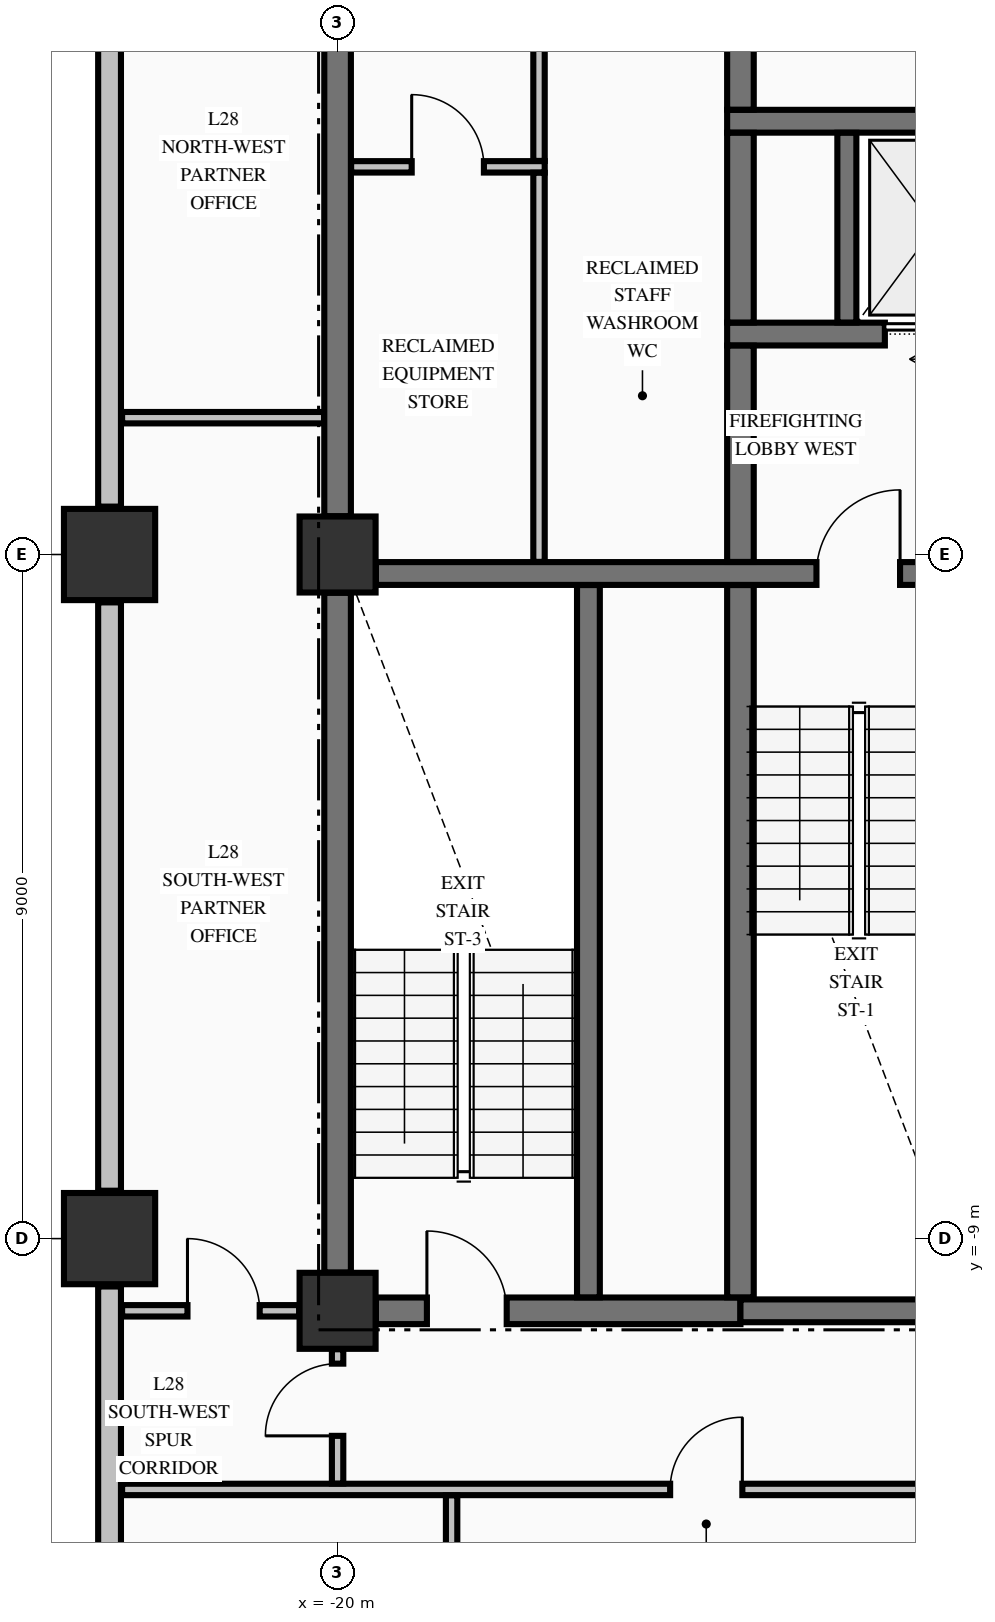
"""IFC4 building model, lengths in metres.
Left out: names, types, materials, properties, quantities, classifications, styles, units other than length and angle.
Written with IfcOpenShell. Run it as: python <this file> out.ifc"""

import sys

from ifc_helpers import new_model, si_unit, direction, frame, frame_2d, origin, origin_2d, place, context, subcontext, project, spatial, rectangle, extrude, element, fill, save


model = new_model("IFC4")
c1 = context("Model", 3, precision=1e-05, world=origin(), true_north=direction((0.0, 1.0)))
c2 = subcontext(c1, "Body", "Model", "MODEL_VIEW")
j1 = project(units=[si_unit("LENGTHUNIT", "METRE"), si_unit("PLANEANGLEUNIT", "RADIAN")], contexts=[c1])
p1 = place(None, origin())
s1 = spatial("IfcSite", under=j1, at=p1, CompositionType="ELEMENT")
p2 = place(p1, origin())
s2 = spatial("IfcBuilding", under=s1, at=p2, CompositionType="ELEMENT")
p3 = place(p2, frame((0.0, 0.0, 112.78)))
s3 = spatial("IfcBuildingStorey", under=s2, at=p3, CompositionType="ELEMENT", Elevation=112.78)
for number, where, z_axis, x_axis in (
    (1, (-23.0, -9.0, -0.25), (0.0, 0.0, 1.0), (1.0, 0.0, 0.0)),
    (2, (-23.0, 0.0, -0.25), (0.0, 0.0, 1.0), (1.0, 0.0, 0.0)),
):
    element("IfcColumn", number, at=place(p3, frame(where, z_axis=z_axis, x_axis=x_axis)), inside=s3, PredefinedType="COLUMN", context=c2, shape_type="SweptSolid", body=[
        extrude(rectangle(XDim=1.2, YDim=1.2, at=origin_2d()), origin(), (0.0, 0.0, 1.0), 3.395),
    ])
for number, where, z_axis, x_axis in (
    (3, (-20.0, -9.95, -0.25), (0.0, 0.0, 1.0), (1.0, 0.0, 0.0)),
    (4, (-20.0, 0.0, -0.25), (0.0, 0.0, 1.0), (1.0, 0.0, 0.0)),
):
    element("IfcColumn", number, at=place(p3, frame(where, z_axis=z_axis, x_axis=x_axis)), inside=s3, PredefinedType="COLUMN", context=c2, shape_type="SweptSolid", body=[
        extrude(rectangle(XDim=1.0, YDim=1.0, at=origin_2d()), origin(), (0.0, 0.0, 1.0), 3.395),
    ])
p4 = place(p3, frame((-23.0, -9.63, 0.0), z_axis=(0.0, 0.0, 1.0), x_axis=(0.0, -1.0, 0.0)))
e5 = element("IfcWall", 5, at=p4, inside=s3, PredefinedType="STANDARD", context=c2, shape_type="SweptSolid", body=[
    extrude(rectangle(XDim=10.74, YDim=0.3, at=frame_2d((5.37, 0.0))), origin(), (0.0, 0.0, 1.0), 2.537),
])
for number, where, z_axis, x_axis in (
    (6, (-23.0, -0.63, 0.0), (0.0, 0.0, 1.0), (0.0, -1.0, 0.0)),
    (7, (-23.0, 8.37, 0.0), (0.0, 0.0, 1.0), (0.0, -1.0, 0.0)),
):
    element("IfcWall", number, at=place(p3, frame(where, z_axis=z_axis, x_axis=x_axis)), inside=s3, PredefinedType="STANDARD", context=c2, shape_type="SweptSolid", body=[
        extrude(rectangle(XDim=7.74, YDim=0.3, at=frame_2d((3.87, 0.0))), origin(), (0.0, 0.0, 1.0), 2.537),
    ])
p5 = place(p3, frame((-19.496, -9.95, 0.0), z_axis=(0.0, 0.0, 1.0), x_axis=(1.0, 0.0, 0.0)))
e8 = element("IfcWall", 8, at=p5, inside=s3, PredefinedType="SHEAR", context=c2, shape_type="SweptSolid", body=[
    extrude(rectangle(XDim=4.796, YDim=0.35, at=frame_2d((2.398, 0.0))), origin(), (0.0, 0.0, 1.0), 3.145),
])
p6 = place(p5, frame((0.671, 0.0, 0.0)))
e9 = element("IfcOpeningElement", 9, at=p6, cuts=e8, PredefinedType="OPENING", context=c2, shape_type="SweptSolid", body=[
    extrude(rectangle(XDim=1.05, YDim=2.15, at=frame_2d((0.525, 1.075))), frame((0.0, 0.185, 0.0), z_axis=(0.0, -1.0, 0.0), x_axis=(1.0, 0.0, 0.0)), (0.0, 0.0, 1.0), 0.37),
])
p7 = place(p3, frame((-14.7, -9.95, 0.0), z_axis=(0.0, 0.0, 1.0), x_axis=(1.0, 0.0, 0.0)))
e10 = element("IfcWall", 10, at=p7, inside=s3, PredefinedType="SHEAR", context=c2, shape_type="SweptSolid", body=[
    extrude(rectangle(XDim=3.196, YDim=0.3, at=frame_2d((1.598, 0.0))), origin(), (0.0, 0.0, 1.0), 3.145),
])
p8 = place(p3, frame((-19.496, -0.25, 0.0), z_axis=(0.0, 0.0, 1.0), x_axis=(1.0, 0.0, 0.0)))
e11 = element("IfcWall", 11, at=p8, inside=s3, PredefinedType="SHEAR", context=c2, shape_type="SweptSolid", body=[
    extrude(rectangle(XDim=7.992, YDim=0.3, at=frame_2d((3.996, 0.0))), origin(), (0.0, 0.0, 1.0), 3.145),
])
p9 = place(p8, frame((5.796, 0.0, 0.0)))
e12 = element("IfcOpeningElement", 12, at=p9, cuts=e11, PredefinedType="OPENING", context=c2, shape_type="SweptSolid", body=[
    extrude(rectangle(XDim=1.1, YDim=2.15, at=frame_2d((0.55, 1.075))), frame((0.0, 0.16, 0.0), z_axis=(0.0, -1.0, 0.0), x_axis=(1.0, 0.0, 0.0)), (0.0, 0.0, 1.0), 0.32),
])
p10 = place(p3, frame((-14.875, 2.9, 0.0), z_axis=(0.0, 0.0, 1.0), x_axis=(1.0, 0.0, 0.0)))
e13 = element("IfcWall", 13, at=p10, inside=s3, PredefinedType="SHEAR", context=c2, shape_type="SweptSolid", body=[
    extrude(rectangle(XDim=4.025, YDim=0.3, at=frame_2d((2.012, 0.0))), origin(), (0.0, 0.0, 1.0), 3.145),
])
p11 = place(p10, frame((2.075, 0.0, 0.0)))
e14 = element("IfcOpeningElement", 14, at=p11, cuts=e13, PredefinedType="OPENING", context=c2, shape_type="SweptSolid", body=[
    extrude(rectangle(XDim=1.1, YDim=2.2, at=frame_2d((0.55, 1.1))), frame((0.0, 0.16, 0.0), z_axis=(0.0, -1.0, 0.0), x_axis=(1.0, 0.0, 0.0)), (0.0, 0.0, 1.0), 0.32),
])
p12 = place(p3, frame((-14.875, 5.7, 0.0), z_axis=(0.0, 0.0, 1.0), x_axis=(1.0, 0.0, 0.0)))
e15 = element("IfcWall", 15, at=p12, inside=s3, PredefinedType="SHEAR", context=c2, shape_type="SweptSolid", body=[
    extrude(rectangle(XDim=4.025, YDim=0.3, at=frame_2d((2.012, 0.0))), origin(), (0.0, 0.0, 1.0), 3.145),
])
p13 = place(p3, frame((-22.835, -12.3, 0.0), z_axis=(0.0, 0.0, 1.0), x_axis=(1.0, 0.0, 0.0)))
e16 = element("IfcWall", 16, at=p13, inside=s3, PredefinedType="PARTITIONING", context=c2, shape_type="SweptSolid", body=[
    extrude(rectangle(XDim=50.67, YDim=0.15, at=frame_2d((25.335, 0.0))), origin(), (0.0, 0.0, 1.0), 3.145),
])
p14 = place(p13, frame((7.21, 0.0, 0.0)))
e17 = element("IfcOpeningElement", 17, at=p14, cuts=e16, PredefinedType="OPENING", context=c2, shape_type="SweptSolid", body=[
    extrude(rectangle(XDim=0.95, YDim=2.15, at=frame_2d((0.475, 1.075))), frame((0.0, 0.085, 0.0), z_axis=(0.0, -1.0, 0.0), x_axis=(1.0, 0.0, 0.0)), (0.0, 0.0, 1.0), 0.17),
])
p15 = place(p13, frame((16.81, 0.0, 0.0)))
e18 = element("IfcOpeningElement", 18, at=p15, cuts=e16, PredefinedType="OPENING", context=c2, shape_type="SweptSolid", body=[
    extrude(rectangle(XDim=1.05, YDim=2.15, at=frame_2d((0.525, 1.075))), frame((0.0, 0.085, 0.0), z_axis=(0.0, -1.0, 0.0), x_axis=(1.0, 0.0, 0.0)), (0.0, 0.0, 1.0), 0.17),
])
p16 = place(p13, frame((28.41, 0.0, 0.0)))
e19 = element("IfcOpeningElement", 19, at=p16, cuts=e16, PredefinedType="OPENING", context=c2, shape_type="SweptSolid", body=[
    extrude(rectangle(XDim=1.05, YDim=2.15, at=frame_2d((0.525, 1.075))), frame((0.0, 0.085, 0.0), z_axis=(0.0, -1.0, 0.0), x_axis=(1.0, 0.0, 0.0)), (0.0, 0.0, 1.0), 0.17),
])
p17 = place(p13, frame((37.91, 0.0, 0.0)))
e20 = element("IfcOpeningElement", 20, at=p17, cuts=e16, PredefinedType="OPENING", context=c2, shape_type="SweptSolid", body=[
    extrude(rectangle(XDim=1.05, YDim=2.15, at=frame_2d((0.525, 1.075))), frame((0.0, 0.085, 0.0), z_axis=(0.0, -1.0, 0.0), x_axis=(1.0, 0.0, 0.0)), (0.0, 0.0, 1.0), 0.17),
])
p18 = place(p3, frame((-22.835, -9.95, 0.0), z_axis=(0.0, 0.0, 1.0), x_axis=(1.0, 0.0, 0.0)))
e21 = element("IfcWall", 21, at=p18, inside=s3, PredefinedType="PARTITIONING", context=c2, shape_type="SweptSolid", body=[
    extrude(rectangle(XDim=2.329, YDim=0.15, at=frame_2d((1.165, 0.0))), origin(), (0.0, 0.0, 1.0), 3.145),
])
p19 = place(p18, frame((0.86, 0.0, 0.0)))
e22 = element("IfcOpeningElement", 22, at=p19, cuts=e21, PredefinedType="OPENING", context=c2, shape_type="SweptSolid", body=[
    extrude(rectangle(XDim=0.95, YDim=2.15, at=frame_2d((0.475, 1.075))), frame((0.0, 0.085, 0.0), z_axis=(0.0, -1.0, 0.0), x_axis=(1.0, 0.0, 0.0)), (0.0, 0.0, 1.0), 0.17),
])
p20 = place(p3, frame((-22.835, 1.8, 0.0), z_axis=(0.0, 0.0, 1.0), x_axis=(1.0, 0.0, 0.0)))
e23 = element("IfcWall", 23, at=p20, inside=s3, PredefinedType="PARTITIONING", context=c2, shape_type="SweptSolid", body=[
    extrude(rectangle(XDim=2.657, YDim=0.15, at=frame_2d((1.329, 0.0))), origin(), (0.0, 0.0, 1.0), 3.145),
])
p21 = place(p3, frame((-19.822, 5.1, 0.0), z_axis=(0.0, 0.0, 1.0), x_axis=(1.0, 0.0, 0.0)))
e24 = element("IfcWall", 24, at=p21, inside=s3, PredefinedType="PARTITIONING", context=c2, shape_type="SweptSolid", body=[
    extrude(rectangle(XDim=2.547, YDim=0.15, at=frame_2d((1.273, 0.0))), origin(), (0.0, 0.0, 1.0), 3.145),
])
p22 = place(p21, frame((0.797, 0.0, 0.0)))
e25 = element("IfcOpeningElement", 25, at=p22, cuts=e24, PredefinedType="OPENING", context=c2, shape_type="SweptSolid", body=[
    extrude(rectangle(XDim=0.95, YDim=2.15, at=frame_2d((0.475, 1.075))), frame((0.0, 0.085, 0.0), z_axis=(0.0, -1.0, 0.0), x_axis=(1.0, 0.0, 0.0)), (0.0, 0.0, 1.0), 0.17),
])
p23 = place(p3, frame((-20.0, -9.446, 0.0), z_axis=(0.0, 0.0, 1.0), x_axis=(0.0, 1.0, 0.0)))
e26 = element("IfcWall", 26, at=p23, inside=s3, PredefinedType="SHEAR", context=c2, shape_type="SweptSolid", body=[
    extrude(rectangle(XDim=8.942, YDim=0.35, at=frame_2d((4.471, 0.0))), origin(), (0.0, 0.0, 1.0), 3.145),
])
p24 = place(p3, frame((-20.0, 0.504, 0.0), z_axis=(0.0, 0.0, 1.0), x_axis=(0.0, 1.0, 0.0)))
e27 = element("IfcWall", 27, at=p24, inside=s3, PredefinedType="SHEAR", context=c2, shape_type="SweptSolid", body=[
    extrude(rectangle(XDim=9.492, YDim=0.35, at=frame_2d((4.746, 0.0))), origin(), (0.0, 0.0, 1.0), 3.145),
])
p25 = place(p3, frame((-16.7, -9.773, 0.0), z_axis=(0.0, 0.0, 1.0), x_axis=(0.0, 1.0, 0.0)))
e28 = element("IfcWall", 28, at=p25, inside=s3, PredefinedType="SHEAR", context=c2, shape_type="SweptSolid", body=[
    extrude(rectangle(XDim=9.371, YDim=0.3, at=frame_2d((4.686, 0.0))), origin(), (0.0, 0.0, 1.0), 3.145),
])
p26 = place(p3, frame((-14.7, -9.773, 0.0), z_axis=(0.0, 0.0, 1.0), x_axis=(0.0, 1.0, 0.0)))
e29 = element("IfcWall", 29, at=p26, inside=s3, PredefinedType="SHEAR", context=c2, shape_type="SweptSolid", body=[
    extrude(rectangle(XDim=9.371, YDim=0.35, at=frame_2d((4.686, 0.0))), origin(), (0.0, 0.0, 1.0), 3.145),
])
p27 = place(p3, frame((-14.7, -0.098, 0.0), z_axis=(0.0, 0.0, 1.0), x_axis=(0.0, 1.0, 0.0)))
e30 = element("IfcWall", 30, at=p27, inside=s3, PredefinedType="SHEAR", context=c2, shape_type="SweptSolid", body=[
    extrude(rectangle(XDim=2.846, YDim=0.35, at=frame_2d((1.423, 0.0))), origin(), (0.0, 0.0, 1.0), 3.145),
])
p28 = place(p3, frame((-14.7, 3.052, 0.0), z_axis=(0.0, 0.0, 1.0), x_axis=(0.0, 1.0, 0.0)))
e31 = element("IfcWall", 31, at=p28, inside=s3, PredefinedType="SHEAR", context=c2, shape_type="SweptSolid", body=[
    extrude(rectangle(XDim=2.496, YDim=0.35, at=frame_2d((1.248, 0.0))), origin(), (0.0, 0.0, 1.0), 3.145),
])
p29 = place(p3, frame((-14.7, 5.852, 0.0), z_axis=(0.0, 0.0, 1.0), x_axis=(0.0, 1.0, 0.0)))
e32 = element("IfcWall", 32, at=p29, inside=s3, PredefinedType="SHEAR", context=c2, shape_type="SweptSolid", body=[
    extrude(rectangle(XDim=4.471, YDim=0.35, at=frame_2d((2.235, 0.0))), origin(), (0.0, 0.0, 1.0), 3.145),
])
p30 = place(p3, frame((-13.3, 3.052, 0.0), z_axis=(0.0, 0.0, 1.0), x_axis=(0.0, 1.0, 0.0)))
e33 = element("IfcWall", 33, at=p30, inside=s3, PredefinedType="SOLIDWALL", context=c2, shape_type="SweptSolid", body=[
    extrude(rectangle(XDim=2.496, YDim=0.25, at=frame_2d((1.248, 0.0))), origin(), (0.0, 0.0, 1.0), 3.145),
])
p31 = place(p3, frame((-20.0, -12.222, 0.0), z_axis=(0.0, 0.0, 1.0), x_axis=(0.0, 1.0, 0.0)))
e34 = element("IfcWall", 34, at=p31, inside=s3, PredefinedType="PARTITIONING", context=c2, shape_type="SweptSolid", body=[
    extrude(rectangle(XDim=1.766, YDim=0.15, at=frame_2d((0.883, 0.0))), origin(), (0.0, 0.0, 1.0), 2.635),
])
p32 = place(p31, frame((0.627, 0.0, 0.0)))
e35 = element("IfcOpeningElement", 35, at=p32, cuts=e34, PredefinedType="OPENING", context=c2, shape_type="SweptSolid", body=[
    extrude(rectangle(XDim=0.95, YDim=2.15, at=frame_2d((0.475, 1.075))), frame((0.0, 0.085, 0.0), z_axis=(0.0, -1.0, 0.0), x_axis=(1.0, 0.0, 0.0)), (0.0, 0.0, 1.0), 0.17),
])
p33 = place(p3, frame((-18.5, -20.394, 0.0), z_axis=(0.0, 0.0, 1.0), x_axis=(0.0, 1.0, 0.0)))
e36 = element("IfcWall", 36, at=p33, inside=s3, PredefinedType="PARTITIONING", context=c2, shape_type="SweptSolid", body=[
    extrude(rectangle(XDim=8.016, YDim=0.15, at=frame_2d((4.008, 0.0))), origin(), (0.0, 0.0, 1.0), 3.145),
])
p34 = place(p3, frame((-17.35, -0.097, 0.0), z_axis=(0.0, 0.0, 1.0), x_axis=(0.0, 1.0, 0.0)))
e37 = element("IfcWall", 37, at=p34, inside=s3, PredefinedType="PARTITIONING", context=c2, shape_type="SweptSolid", body=[
    extrude(rectangle(XDim=5.119, YDim=0.15, at=frame_2d((2.56, 0.0))), origin(), (0.0, 0.0, 1.0), 3.145),
])
p35 = place(p3, frame((-17.35, 5.178, 0.0), z_axis=(0.0, 0.0, 1.0), x_axis=(0.0, 1.0, 0.0)))
e38 = element("IfcWall", 38, at=p35, inside=s3, PredefinedType="PARTITIONING", context=c2, shape_type="SweptSolid", body=[
    extrude(rectangle(XDim=5.144, YDim=0.15, at=frame_2d((2.572, 0.0))), origin(), (0.0, 0.0, 1.0), 3.145),
])
p36 = place(p9, origin())
e39 = element("IfcDoor", 39, at=p36, inside=s3, OperationType="SINGLE_SWING_RIGHT", PredefinedType="DOOR", context=c2, shape_type="SweptSolid", body=[
    extrude(rectangle(XDim=1.1, YDim=2.15, at=frame_2d((0.55, 1.075))), frame((0.0, 0.025, 0.0), z_axis=(0.0, -1.0, 0.0), x_axis=(1.0, 0.0, 0.0)), (0.0, 0.0, 1.0), 0.05),
])
fill(e12, e39)
p37 = place(p11, origin())
e40 = element("IfcDoor", 40, at=p37, inside=s3, OperationType="SLIDING_TO_LEFT", PredefinedType="DOOR", context=c2, shape_type="SweptSolid", body=[
    extrude(rectangle(XDim=1.1, YDim=2.2, at=frame_2d((0.55, 1.1))), frame((0.0, 0.025, 0.0), z_axis=(0.0, -1.0, 0.0), x_axis=(1.0, 0.0, 0.0)), (0.0, 0.0, 1.0), 0.05),
])
fill(e14, e40)
p38 = place(p6, origin())
e41 = element("IfcDoor", 41, at=p38, inside=s3, OperationType="SINGLE_SWING_LEFT", PredefinedType="DOOR", context=c2, shape_type="SweptSolid", body=[
    extrude(rectangle(XDim=1.05, YDim=2.15, at=frame_2d((0.525, 1.075))), frame((0.0, 0.025, 0.0), z_axis=(0.0, -1.0, 0.0), x_axis=(1.0, 0.0, 0.0)), (0.0, 0.0, 1.0), 0.05),
])
fill(e9, e41)
p39 = place(p22, origin())
e42 = element("IfcDoor", 42, at=p39, inside=s3, OperationType="SINGLE_SWING_LEFT", PredefinedType="DOOR", context=c2, shape_type="SweptSolid", body=[
    extrude(rectangle(XDim=0.95, YDim=2.15, at=frame_2d((0.475, 1.075))), frame((0.0, 0.025, 0.0), z_axis=(0.0, -1.0, 0.0), x_axis=(1.0, 0.0, 0.0)), (0.0, 0.0, 1.0), 0.05),
])
fill(e25, e42)
p40 = place(p14, origin())
e43 = element("IfcDoor", 43, at=p40, inside=s3, OperationType="SINGLE_SWING_RIGHT", PredefinedType="DOOR", context=c2, shape_type="SweptSolid", body=[
    extrude(rectangle(XDim=0.95, YDim=2.15, at=frame_2d((0.475, 1.075))), frame((0.0, 0.025, 0.0), z_axis=(0.0, -1.0, 0.0), x_axis=(1.0, 0.0, 0.0)), (0.0, 0.0, 1.0), 0.05),
])
fill(e17, e43)
p41 = place(p32, origin())
e44 = element("IfcDoor", 44, at=p41, inside=s3, OperationType="SINGLE_SWING_LEFT", PredefinedType="DOOR", context=c2, shape_type="SweptSolid", body=[
    extrude(rectangle(XDim=0.95, YDim=2.15, at=frame_2d((0.475, 1.075))), frame((0.0, 0.025, 0.0), z_axis=(0.0, -1.0, 0.0), x_axis=(1.0, 0.0, 0.0)), (0.0, 0.0, 1.0), 0.05),
])
fill(e35, e44)
p42 = place(p19, origin())
e45 = element("IfcDoor", 45, at=p42, inside=s3, OperationType="SINGLE_SWING_LEFT", PredefinedType="DOOR", context=c2, shape_type="SweptSolid", body=[
    extrude(rectangle(XDim=0.95, YDim=2.15, at=frame_2d((0.475, 1.075))), frame((0.0, 0.025, 0.0), z_axis=(0.0, -1.0, 0.0), x_axis=(1.0, 0.0, 0.0)), (0.0, 0.0, 1.0), 0.05),
])
fill(e22, e45)
save(model, sys.argv[1])
